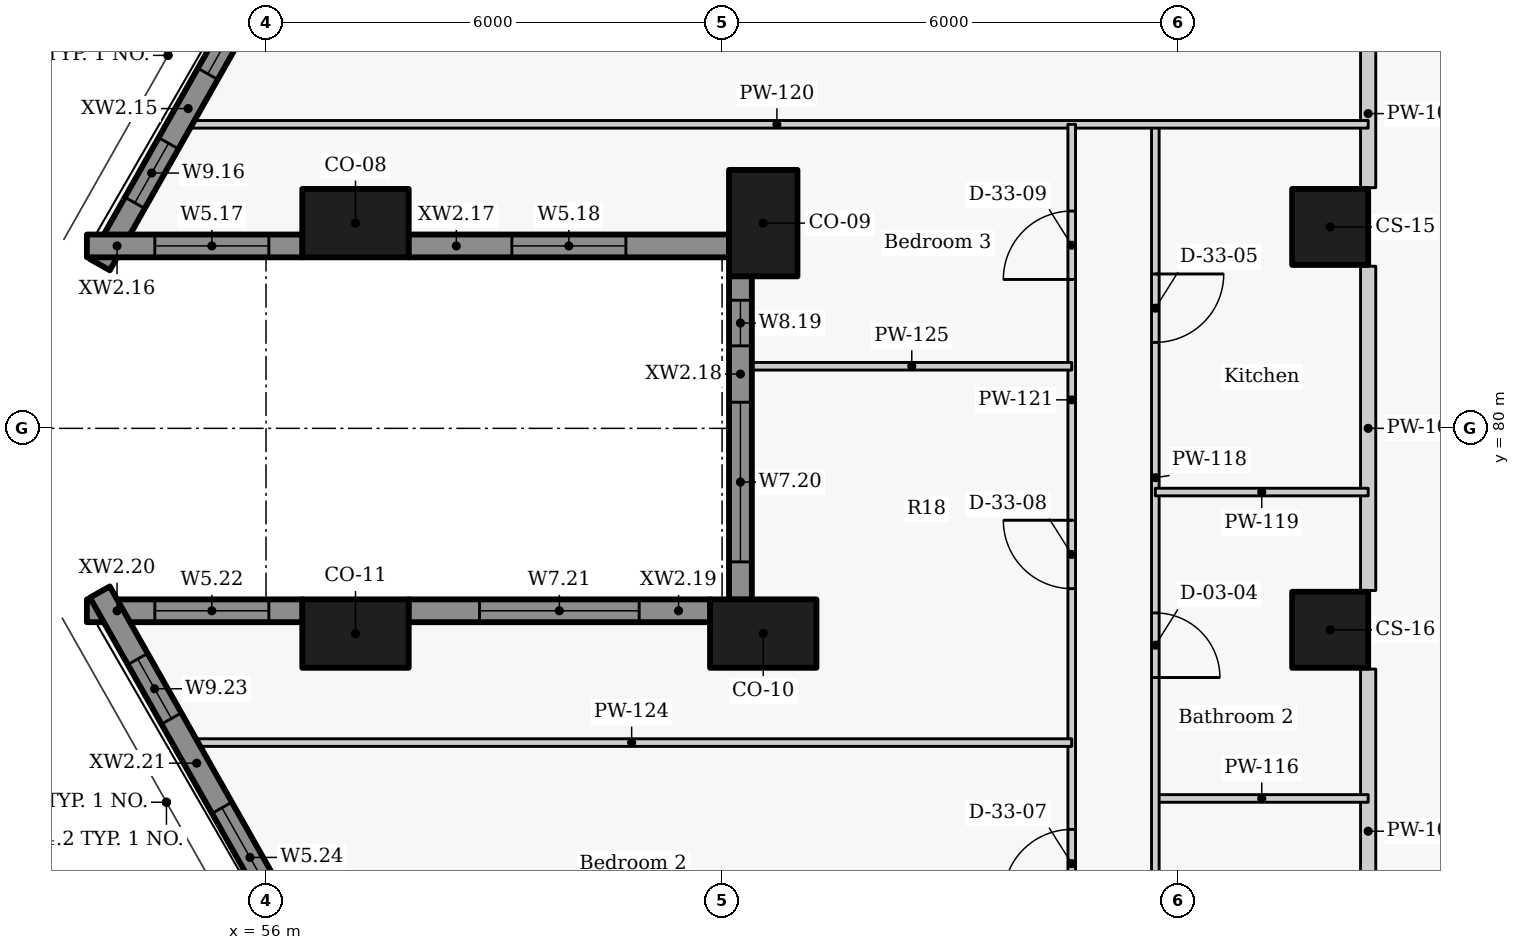
"""IFC4 building model, lengths in metres.
Left out: names, types, materials, properties, quantities, classifications, styles, units other than length and angle.
Written with IfcOpenShell. Run it as: python <this file> out.ifc"""

import sys

from ifc_helpers import new_model, si_unit, direction, frame, frame_2d, origin, origin_2d, place, context, subcontext, project, spatial, rectangle, extrude, element, fill, save


model = new_model("IFC4")
c1 = context("Model", 3, precision=1e-05, world=origin(), true_north=direction((0.0, 1.0)))
c2 = subcontext(c1, "Body", "Model", "MODEL_VIEW")
j1 = project(units=[si_unit("LENGTHUNIT", "METRE"), si_unit("PLANEANGLEUNIT", "RADIAN")], contexts=[c1])
p1 = place(None, origin())
s1 = spatial("IfcSite", under=j1, at=p1, CompositionType="ELEMENT")
p2 = place(p1, origin())
s2 = spatial("IfcBuilding", under=s1, at=p2, CompositionType="ELEMENT")
p3 = place(p2, frame((0.0, 0.0, 87.6)))
s3 = spatial("IfcBuildingStorey", under=s2, at=p3, CompositionType="ELEMENT", Elevation=87.6)
for number, where, z_axis, x_axis in (
    (1, (57.177, 82.7, 0.0), (0.0, 0.0, 1.0), (1.0, 0.0, 0.0)),
    (2, (62.542, 82.7, 0.0), (0.0, 0.0, 1.0), (0.0, -1.0, 0.0)),
    (3, (62.542, 77.3, 0.0), (0.0, 0.0, 1.0), (-1.0, 0.0, 0.0)),
    (4, (57.177, 77.3, 0.0), (0.0, 0.0, 1.0), (-1.0, 0.0, 0.0)),
):
    element("IfcColumn", number, at=place(p3, frame(where, z_axis=z_axis, x_axis=x_axis)), inside=s3, PredefinedType="COLUMN", context=c2, shape_type="SweptSolid", body=[
        extrude(rectangle(XDim=1.4, YDim=0.9, at=origin_2d()), origin(), (0.0, 0.0, 1.0), 3.3),
    ])
for number, where, z_axis, x_axis in (
    (5, (70.0, 82.65, 0.0), (0.0, 0.0, 1.0), (0.0, -1.0, 0.0)),
    (6, (70.0, 77.35, 0.0), (0.0, 0.0, 1.0), (0.0, -1.0, 0.0)),
):
    element("IfcColumn", number, at=place(p3, frame(where, z_axis=z_axis, x_axis=x_axis)), inside=s3, PredefinedType="COLUMN", context=c2, shape_type="SweptSolid", body=[
        extrude(rectangle(XDim=1.0, YDim=1.0, at=origin_2d()), origin(), (0.0, 0.0, 1.0), 3.3),
    ])
p4 = place(p3, frame((56.609, 87.094, 0.0), z_axis=(0.0, 0.0, 1.0), x_axis=(-0.492456858874, -0.870336855561, 0.0)))
e7 = element("IfcWall", 7, at=p4, inside=s3, PredefinedType="SOLIDWALL", context=c2, shape_type="SweptSolid", body=[
    extrude(rectangle(XDim=5.677, YDim=0.3, at=frame_2d((2.838, 0.0))), origin(), (0.0, 0.0, 1.0), 2.425),
])
p5 = place(p4, frame((0.692, 0.0, 0.9)))
e8 = element("IfcOpeningElement", 8, at=p5, cuts=e7, PredefinedType="OPENING", context=c2, shape_type="SweptSolid", body=[
    extrude(rectangle(XDim=2.1, YDim=1.1, at=frame_2d((1.05, 0.55))), frame((0.0, 0.16, 0.0), z_axis=(0.0, -1.0, 0.0), x_axis=(1.0, 0.0, 0.0)), (0.0, 0.0, 1.0), 0.32),
])
p6 = place(p4, frame((3.842, 0.0, 0.9)))
e9 = element("IfcOpeningElement", 9, at=p6, cuts=e7, PredefinedType="OPENING", context=c2, shape_type="SweptSolid", body=[
    extrude(rectangle(XDim=0.9, YDim=1.1, at=frame_2d((0.45, 0.55))), frame((0.0, 0.16, 0.0), z_axis=(0.0, -1.0, 0.0), x_axis=(1.0, 0.0, 0.0)), (0.0, 0.0, 1.0), 0.32),
])
p7 = place(p3, frame((53.643, 82.4, 0.0), z_axis=(0.0, 0.0, 1.0), x_axis=(1.0, 0.0, 0.0)))
e10 = element("IfcWall", 10, at=p7, inside=s3, PredefinedType="SOLIDWALL", context=c2, shape_type="SweptSolid", body=[
    extrude(rectangle(XDim=2.838, YDim=0.3, at=frame_2d((1.419, 0.0))), origin(), (0.0, 0.0, 1.0), 2.425),
])
p8 = place(p7, frame((0.894, 0.0, 0.9)))
e11 = element("IfcOpeningElement", 11, at=p8, cuts=e10, PredefinedType="OPENING", context=c2, shape_type="SweptSolid", body=[
    extrude(rectangle(XDim=1.5, YDim=1.1, at=frame_2d((0.75, 0.55))), frame((0.0, 0.16, 0.0), z_axis=(0.0, -1.0, 0.0), x_axis=(1.0, 0.0, 0.0)), (0.0, 0.0, 1.0), 0.32),
])
p9 = place(p3, frame((57.873, 82.4, 0.0), z_axis=(0.0, 0.0, 1.0), x_axis=(1.0, 0.0, 0.0)))
e12 = element("IfcWall", 12, at=p9, inside=s3, PredefinedType="SOLIDWALL", context=c2, shape_type="SweptSolid", body=[
    extrude(rectangle(XDim=4.223, YDim=0.3, at=frame_2d((2.111, 0.0))), origin(), (0.0, 0.0, 1.0), 2.425),
])
p10 = place(p9, frame((1.361, 0.0, 0.9)))
e13 = element("IfcOpeningElement", 13, at=p10, cuts=e12, PredefinedType="OPENING", context=c2, shape_type="SweptSolid", body=[
    extrude(rectangle(XDim=1.5, YDim=1.1, at=frame_2d((0.75, 0.55))), frame((0.0, 0.16, 0.0), z_axis=(0.0, -1.0, 0.0), x_axis=(1.0, 0.0, 0.0)), (0.0, 0.0, 1.0), 0.32),
])
p11 = place(p3, frame((62.242, 82.004, 0.0), z_axis=(0.0, 0.0, 1.0), x_axis=(0.0, -1.0, 0.0)))
e14 = element("IfcWall", 14, at=p11, inside=s3, PredefinedType="SOLIDWALL", context=c2, shape_type="SweptSolid", body=[
    extrude(rectangle(XDim=4.258, YDim=0.3, at=frame_2d((2.129, 0.0))), origin(), (0.0, 0.0, 1.0), 2.425),
])
p12 = place(p11, frame((0.319, 0.0, 0.9)))
e15 = element("IfcOpeningElement", 15, at=p12, cuts=e14, PredefinedType="OPENING", context=c2, shape_type="SweptSolid", body=[
    extrude(rectangle(XDim=0.6, YDim=1.1, at=frame_2d((0.3, 0.55))), frame((0.0, 0.16, 0.0), z_axis=(0.0, -1.0, 0.0), x_axis=(1.0, 0.0, 0.0)), (0.0, 0.0, 1.0), 0.32),
])
p13 = place(p11, frame((1.66, 0.0, 0.9)))
e16 = element("IfcOpeningElement", 16, at=p13, cuts=e14, PredefinedType="OPENING", context=c2, shape_type="SweptSolid", body=[
    extrude(rectangle(XDim=2.1, YDim=1.1, at=frame_2d((1.05, 0.55))), frame((0.0, 0.16, 0.0), z_axis=(0.0, -1.0, 0.0), x_axis=(1.0, 0.0, 0.0)), (0.0, 0.0, 1.0), 0.32),
])
p14 = place(p3, frame((61.846, 77.6, 0.0), z_axis=(0.0, 0.0, 1.0), x_axis=(-1.0, 0.0, 0.0)))
e17 = element("IfcWall", 17, at=p14, inside=s3, PredefinedType="SOLIDWALL", context=c2, shape_type="SweptSolid", body=[
    extrude(rectangle(XDim=3.973, YDim=0.3, at=frame_2d((1.986, 0.0))), origin(), (0.0, 0.0, 1.0), 2.425),
])
p15 = place(p14, frame((0.936, 0.0, 0.9)))
e18 = element("IfcOpeningElement", 18, at=p15, cuts=e17, PredefinedType="OPENING", context=c2, shape_type="SweptSolid", body=[
    extrude(rectangle(XDim=2.1, YDim=1.1, at=frame_2d((1.05, 0.55))), frame((0.0, 0.16, 0.0), z_axis=(0.0, -1.0, 0.0), x_axis=(1.0, 0.0, 0.0)), (0.0, 0.0, 1.0), 0.32),
])
p16 = place(p3, frame((56.481, 77.6, 0.0), z_axis=(0.0, 0.0, 1.0), x_axis=(-1.0, 0.0, 0.0)))
e19 = element("IfcWall", 19, at=p16, inside=s3, PredefinedType="SOLIDWALL", context=c2, shape_type="SweptSolid", body=[
    extrude(rectangle(XDim=2.838, YDim=0.3, at=frame_2d((1.419, 0.0))), origin(), (0.0, 0.0, 1.0), 2.425),
])
p17 = place(p16, frame((0.444, 0.0, 0.9)))
e20 = element("IfcOpeningElement", 20, at=p17, cuts=e19, PredefinedType="OPENING", context=c2, shape_type="SweptSolid", body=[
    extrude(rectangle(XDim=1.5, YDim=1.1, at=frame_2d((0.75, 0.55))), frame((0.0, 0.16, 0.0), z_axis=(0.0, -1.0, 0.0), x_axis=(1.0, 0.0, 0.0)), (0.0, 0.0, 1.0), 0.32),
])
p18 = place(p3, frame((53.814, 77.847, 0.0), z_axis=(0.0, 0.0, 1.0), x_axis=(0.492456858874, -0.870336855561, 0.0)))
e21 = element("IfcWall", 21, at=p18, inside=s3, PredefinedType="SOLIDWALL", context=c2, shape_type="SweptSolid", body=[
    extrude(rectangle(XDim=5.677, YDim=0.3, at=frame_2d((2.838, 0.0))), origin(), (0.0, 0.0, 1.0), 2.425),
])
p19 = place(p18, frame((1.012, 0.0, 0.9)))
e22 = element("IfcOpeningElement", 22, at=p19, cuts=e21, PredefinedType="OPENING", context=c2, shape_type="SweptSolid", body=[
    extrude(rectangle(XDim=0.9, YDim=1.1, at=frame_2d((0.45, 0.55))), frame((0.0, 0.16, 0.0), z_axis=(0.0, -1.0, 0.0), x_axis=(1.0, 0.0, 0.0)), (0.0, 0.0, 1.0), 0.32),
])
p20 = place(p18, frame((3.261, 0.0, 0.9)))
e23 = element("IfcOpeningElement", 23, at=p20, cuts=e21, PredefinedType="OPENING", context=c2, shape_type="SweptSolid", body=[
    extrude(rectangle(XDim=1.5, YDim=1.1, at=frame_2d((0.75, 0.55))), frame((0.0, 0.16, 0.0), z_axis=(0.0, -1.0, 0.0), x_axis=(1.0, 0.0, 0.0)), (0.0, 0.0, 1.0), 0.32),
])
for number, where, z_axis, x_axis in (
    (24, (70.5, 72.567, 0.0), (0.0, 0.0, 1.0), (0.0, 1.0, 0.0)),
    (25, (70.5, 77.867, 0.0), (0.0, 0.0, 1.0), (0.0, 1.0, 0.0)),
):
    element("IfcWall", number, at=place(p3, frame(where, z_axis=z_axis, x_axis=x_axis)), inside=s3, PredefinedType="PARTITIONING", context=c2, shape_type="SweptSolid", body=[
        extrude(rectangle(XDim=4.266, YDim=0.2, at=frame_2d((2.133, 0.0))), origin(), (0.0, 0.0, 1.0), 3.025),
    ])
p21 = place(p3, frame((70.5, 83.167, 0.0), z_axis=(0.0, 0.0, 1.0), x_axis=(0.0, 1.0, 0.0)))
e26 = element("IfcWall", 26, at=p21, inside=s3, PredefinedType="PARTITIONING", context=c2, shape_type="SweptSolid", body=[
    extrude(rectangle(XDim=4.266, YDim=0.2, at=frame_2d((2.133, 0.0))), origin(), (0.0, 0.0, 1.0), 3.025),
])
p22 = place(p21, frame((2.048, 0.0, 0.0)))
e27 = element("IfcOpeningElement", 27, at=p22, cuts=e26, PredefinedType="OPENING", context=c2, shape_type="SweptSolid", body=[
    extrude(rectangle(XDim=1.0, YDim=2.1, at=frame_2d((0.5, 1.05))), frame((0.0, 0.11, 0.0), z_axis=(0.0, -1.0, 0.0), x_axis=(1.0, 0.0, 0.0)), (0.0, 0.0, 1.0), 0.22),
])
p23 = place(p3, frame((67.7, 75.131, 0.0), z_axis=(0.0, 0.0, 1.0), x_axis=(1.0, 0.0, 0.0)))
e28 = element("IfcWall", 28, at=p23, inside=s3, PredefinedType="PARTITIONING", context=c2, shape_type="SweptSolid", body=[
    extrude(rectangle(XDim=2.8, YDim=0.1, at=frame_2d((1.4, 0.0))), origin(), (0.0, 0.0, 1.0), 2.505),
])
p24 = place(p3, frame((67.7, 84.0, 0.0), z_axis=(0.0, 0.0, 1.0), x_axis=(0.0, -1.0, 0.0)))
e29 = element("IfcWall", 29, at=p24, inside=s3, PredefinedType="PARTITIONING", context=c2, shape_type="SweptSolid", body=[
    extrude(rectangle(XDim=12.9, YDim=0.1, at=frame_2d((6.45, 0.0))), origin(), (0.0, 0.0, 1.0), 3.025),
])
p25 = place(p24, frame((10.459, 0.0, 0.0)))
e30 = element("IfcOpeningElement", 30, at=p25, cuts=e29, PredefinedType="OPENING", context=c2, shape_type="SweptSolid", body=[
    extrude(rectangle(XDim=0.85, YDim=2.1, at=frame_2d((0.425, 1.05))), frame((0.0, 0.06, 0.0), z_axis=(0.0, -1.0, 0.0), x_axis=(1.0, 0.0, 0.0)), (0.0, 0.0, 1.0), 0.12),
])
p26 = place(p24, frame((6.428, 0.0, 0.0)))
e31 = element("IfcOpeningElement", 31, at=p26, cuts=e29, PredefinedType="OPENING", context=c2, shape_type="SweptSolid", body=[
    extrude(rectangle(XDim=0.85, YDim=2.1, at=frame_2d((0.425, 1.05))), frame((0.0, 0.06, 0.0), z_axis=(0.0, -1.0, 0.0), x_axis=(1.0, 0.0, 0.0)), (0.0, 0.0, 1.0), 0.12),
])
p27 = place(p24, frame((1.969, 0.0, 0.0)))
e32 = element("IfcOpeningElement", 32, at=p27, cuts=e29, PredefinedType="OPENING", context=c2, shape_type="SweptSolid", body=[
    extrude(rectangle(XDim=0.9, YDim=2.1, at=frame_2d((0.45, 1.05))), frame((0.0, 0.06, 0.0), z_axis=(0.0, -1.0, 0.0), x_axis=(1.0, 0.0, 0.0)), (0.0, 0.0, 1.0), 0.12),
])
p28 = place(p3, frame((67.7, 79.162, 0.0), z_axis=(0.0, 0.0, 1.0), x_axis=(1.0, 0.0, 0.0)))
e33 = element("IfcWall", 33, at=p28, inside=s3, PredefinedType="PARTITIONING", context=c2, shape_type="SweptSolid", body=[
    extrude(rectangle(XDim=2.8, YDim=0.1, at=frame_2d((1.4, 0.0))), origin(), (0.0, 0.0, 1.0), 2.505),
])
p29 = place(p3, frame((54.943, 84.0, 0.0), z_axis=(0.0, 0.0, 1.0), x_axis=(1.0, 0.0, 0.0)))
e34 = element("IfcWall", 34, at=p29, inside=s3, PredefinedType="PARTITIONING", context=c2, shape_type="SweptSolid", body=[
    extrude(rectangle(XDim=15.557, YDim=0.1, at=frame_2d((7.778, 0.0))), origin(), (0.0, 0.0, 1.0), 2.405),
])
p30 = place(p3, frame((66.6, 69.5, 0.0), z_axis=(0.0, 0.0, 1.0), x_axis=(0.0, 1.0, 0.0)))
e35 = element("IfcWall", 35, at=p30, inside=s3, PredefinedType="PARTITIONING", context=c2, shape_type="SweptSolid", body=[
    extrude(rectangle(XDim=14.5, YDim=0.1, at=frame_2d((7.25, 0.0))), origin(), (0.0, 0.0, 1.0), 3.025),
])
p31 = place(p30, frame((1.141, 0.0, 0.0)))
e36 = element("IfcOpeningElement", 36, at=p31, cuts=e35, PredefinedType="OPENING", context=c2, shape_type="SweptSolid", body=[
    extrude(rectangle(XDim=0.9, YDim=2.1, at=frame_2d((0.45, 1.05))), frame((0.0, 0.06, 0.0), z_axis=(0.0, -1.0, 0.0), x_axis=(1.0, 0.0, 0.0)), (0.0, 0.0, 1.0), 0.12),
])
p32 = place(p30, frame((4.324, 0.0, 0.0)))
e37 = element("IfcOpeningElement", 37, at=p32, cuts=e35, PredefinedType="OPENING", context=c2, shape_type="SweptSolid", body=[
    extrude(rectangle(XDim=0.9, YDim=2.1, at=frame_2d((0.45, 1.05))), frame((0.0, 0.06, 0.0), z_axis=(0.0, -1.0, 0.0), x_axis=(1.0, 0.0, 0.0)), (0.0, 0.0, 1.0), 0.12),
])
p33 = place(p30, frame((8.391, 0.0, 0.0)))
e38 = element("IfcOpeningElement", 38, at=p33, cuts=e35, PredefinedType="OPENING", context=c2, shape_type="SweptSolid", body=[
    extrude(rectangle(XDim=0.9, YDim=2.1, at=frame_2d((0.45, 1.05))), frame((0.0, 0.06, 0.0), z_axis=(0.0, -1.0, 0.0), x_axis=(1.0, 0.0, 0.0)), (0.0, 0.0, 1.0), 0.12),
])
p34 = place(p30, frame((12.459, 0.0, 0.0)))
e39 = element("IfcOpeningElement", 39, at=p34, cuts=e35, PredefinedType="OPENING", context=c2, shape_type="SweptSolid", body=[
    extrude(rectangle(XDim=0.9, YDim=2.1, at=frame_2d((0.45, 1.05))), frame((0.0, 0.06, 0.0), z_axis=(0.0, -1.0, 0.0), x_axis=(1.0, 0.0, 0.0)), (0.0, 0.0, 1.0), 0.12),
])
p35 = place(p3, frame((55.021, 75.866, 0.0), z_axis=(0.0, 0.0, 1.0), x_axis=(1.0, 0.0, 0.0)))
e40 = element("IfcWall", 40, at=p35, inside=s3, PredefinedType="PARTITIONING", context=c2, shape_type="SweptSolid", body=[
    extrude(rectangle(XDim=11.58, YDim=0.1, at=frame_2d((5.79, 0.0))), origin(), (0.0, 0.0, 1.0), 2.405),
])
p36 = place(p3, frame((62.392, 80.817, 0.0), z_axis=(0.0, 0.0, 1.0), x_axis=(1.0, 0.0, 0.0)))
e41 = element("IfcWall", 41, at=p36, inside=s3, PredefinedType="PARTITIONING", context=c2, shape_type="SweptSolid", body=[
    extrude(rectangle(XDim=4.208, YDim=0.1, at=frame_2d((2.104, 0.0))), origin(), (0.0, 0.0, 1.0), 2.405),
])
p37 = place(p5, origin())
e42 = element("IfcWindow", 42, at=p37, inside=s3, PartitioningType="SINGLE_PANEL", PredefinedType="WINDOW", context=c2, shape_type="SweptSolid", body=[
    extrude(rectangle(XDim=2.1, YDim=1.1, at=frame_2d((1.05, 0.55))), frame((0.0, 0.03, 0.0), z_axis=(0.0, -1.0, 0.0), x_axis=(1.0, 0.0, 0.0)), (0.0, 0.0, 1.0), 0.06),
])
fill(e8, e42)
p38 = place(p6, origin())
e43 = element("IfcWindow", 43, at=p38, inside=s3, PartitioningType="SINGLE_PANEL", PredefinedType="WINDOW", context=c2, shape_type="SweptSolid", body=[
    extrude(rectangle(XDim=0.9, YDim=1.1, at=frame_2d((0.45, 0.55))), frame((0.0, 0.03, 0.0), z_axis=(0.0, -1.0, 0.0), x_axis=(1.0, 0.0, 0.0)), (0.0, 0.0, 1.0), 0.06),
])
fill(e9, e43)
p39 = place(p8, origin())
e44 = element("IfcWindow", 44, at=p39, inside=s3, PartitioningType="SINGLE_PANEL", PredefinedType="WINDOW", context=c2, shape_type="SweptSolid", body=[
    extrude(rectangle(XDim=1.5, YDim=1.1, at=frame_2d((0.75, 0.55))), frame((0.0, 0.03, 0.0), z_axis=(0.0, -1.0, 0.0), x_axis=(1.0, 0.0, 0.0)), (0.0, 0.0, 1.0), 0.06),
])
fill(e11, e44)
p40 = place(p10, origin())
e45 = element("IfcWindow", 45, at=p40, inside=s3, PartitioningType="SINGLE_PANEL", PredefinedType="WINDOW", context=c2, shape_type="SweptSolid", body=[
    extrude(rectangle(XDim=1.5, YDim=1.1, at=frame_2d((0.75, 0.55))), frame((0.0, 0.03, 0.0), z_axis=(0.0, -1.0, 0.0), x_axis=(1.0, 0.0, 0.0)), (0.0, 0.0, 1.0), 0.06),
])
fill(e13, e45)
p41 = place(p12, origin())
e46 = element("IfcWindow", 46, at=p41, inside=s3, PartitioningType="SINGLE_PANEL", PredefinedType="WINDOW", context=c2, shape_type="SweptSolid", body=[
    extrude(rectangle(XDim=0.6, YDim=1.1, at=frame_2d((0.3, 0.55))), frame((0.0, 0.03, 0.0), z_axis=(0.0, -1.0, 0.0), x_axis=(1.0, 0.0, 0.0)), (0.0, 0.0, 1.0), 0.06),
])
fill(e15, e46)
p42 = place(p13, origin())
e47 = element("IfcWindow", 47, at=p42, inside=s3, PartitioningType="SINGLE_PANEL", PredefinedType="WINDOW", context=c2, shape_type="SweptSolid", body=[
    extrude(rectangle(XDim=2.1, YDim=1.1, at=frame_2d((1.05, 0.55))), frame((0.0, 0.03, 0.0), z_axis=(0.0, -1.0, 0.0), x_axis=(1.0, 0.0, 0.0)), (0.0, 0.0, 1.0), 0.06),
])
fill(e16, e47)
p43 = place(p15, origin())
e48 = element("IfcWindow", 48, at=p43, inside=s3, PartitioningType="SINGLE_PANEL", PredefinedType="WINDOW", context=c2, shape_type="SweptSolid", body=[
    extrude(rectangle(XDim=2.1, YDim=1.1, at=frame_2d((1.05, 0.55))), frame((0.0, 0.03, 0.0), z_axis=(0.0, -1.0, 0.0), x_axis=(1.0, 0.0, 0.0)), (0.0, 0.0, 1.0), 0.06),
])
fill(e18, e48)
p44 = place(p17, origin())
e49 = element("IfcWindow", 49, at=p44, inside=s3, PartitioningType="SINGLE_PANEL", PredefinedType="WINDOW", context=c2, shape_type="SweptSolid", body=[
    extrude(rectangle(XDim=1.5, YDim=1.1, at=frame_2d((0.75, 0.55))), frame((0.0, 0.03, 0.0), z_axis=(0.0, -1.0, 0.0), x_axis=(1.0, 0.0, 0.0)), (0.0, 0.0, 1.0), 0.06),
])
fill(e20, e49)
p45 = place(p19, origin())
e50 = element("IfcWindow", 50, at=p45, inside=s3, PartitioningType="SINGLE_PANEL", PredefinedType="WINDOW", context=c2, shape_type="SweptSolid", body=[
    extrude(rectangle(XDim=0.9, YDim=1.1, at=frame_2d((0.45, 0.55))), frame((0.0, 0.03, 0.0), z_axis=(0.0, -1.0, 0.0), x_axis=(1.0, 0.0, 0.0)), (0.0, 0.0, 1.0), 0.06),
])
fill(e22, e50)
p46 = place(p20, origin())
e51 = element("IfcWindow", 51, at=p46, inside=s3, PartitioningType="SINGLE_PANEL", PredefinedType="WINDOW", context=c2, shape_type="SweptSolid", body=[
    extrude(rectangle(XDim=1.5, YDim=1.1, at=frame_2d((0.75, 0.55))), frame((0.0, 0.03, 0.0), z_axis=(0.0, -1.0, 0.0), x_axis=(1.0, 0.0, 0.0)), (0.0, 0.0, 1.0), 0.06),
])
fill(e23, e51)
p47 = place(p26, origin())
e52 = element("IfcDoor", 52, at=p47, inside=s3, OperationType="SINGLE_SWING_RIGHT", PredefinedType="DOOR", context=c2, shape_type="SweptSolid", body=[
    extrude(rectangle(XDim=0.85, YDim=2.1, at=frame_2d((0.425, 1.05))), frame((0.0, 0.025, 0.0), z_axis=(0.0, -1.0, 0.0), x_axis=(1.0, 0.0, 0.0)), (0.0, 0.0, 1.0), 0.05),
])
fill(e31, e52)
p48 = place(p27, origin())
e53 = element("IfcDoor", 53, at=p48, inside=s3, OperationType="SINGLE_SWING_LEFT", PredefinedType="DOOR", context=c2, shape_type="SweptSolid", body=[
    extrude(rectangle(XDim=0.9, YDim=2.1, at=frame_2d((0.45, 1.05))), frame((0.0, 0.025, 0.0), z_axis=(0.0, -1.0, 0.0), x_axis=(1.0, 0.0, 0.0)), (0.0, 0.0, 1.0), 0.05),
])
fill(e32, e53)
p49 = place(p32, origin())
e54 = element("IfcDoor", 54, at=p49, inside=s3, OperationType="SINGLE_SWING_LEFT", PredefinedType="DOOR", context=c2, shape_type="SweptSolid", body=[
    extrude(rectangle(XDim=0.9, YDim=2.1, at=frame_2d((0.45, 1.05))), frame((0.0, 0.025, 0.0), z_axis=(0.0, -1.0, 0.0), x_axis=(1.0, 0.0, 0.0)), (0.0, 0.0, 1.0), 0.05),
])
fill(e37, e54)
p50 = place(p33, origin())
e55 = element("IfcDoor", 55, at=p50, inside=s3, OperationType="SINGLE_SWING_RIGHT", PredefinedType="DOOR", context=c2, shape_type="SweptSolid", body=[
    extrude(rectangle(XDim=0.9, YDim=2.1, at=frame_2d((0.45, 1.05))), frame((0.0, 0.025, 0.0), z_axis=(0.0, -1.0, 0.0), x_axis=(1.0, 0.0, 0.0)), (0.0, 0.0, 1.0), 0.05),
])
fill(e38, e55)
p51 = place(p34, origin())
e56 = element("IfcDoor", 56, at=p51, inside=s3, OperationType="SINGLE_SWING_LEFT", PredefinedType="DOOR", context=c2, shape_type="SweptSolid", body=[
    extrude(rectangle(XDim=0.9, YDim=2.1, at=frame_2d((0.45, 1.05))), frame((0.0, 0.025, 0.0), z_axis=(0.0, -1.0, 0.0), x_axis=(1.0, 0.0, 0.0)), (0.0, 0.0, 1.0), 0.05),
])
fill(e39, e56)
save(model, sys.argv[1])
